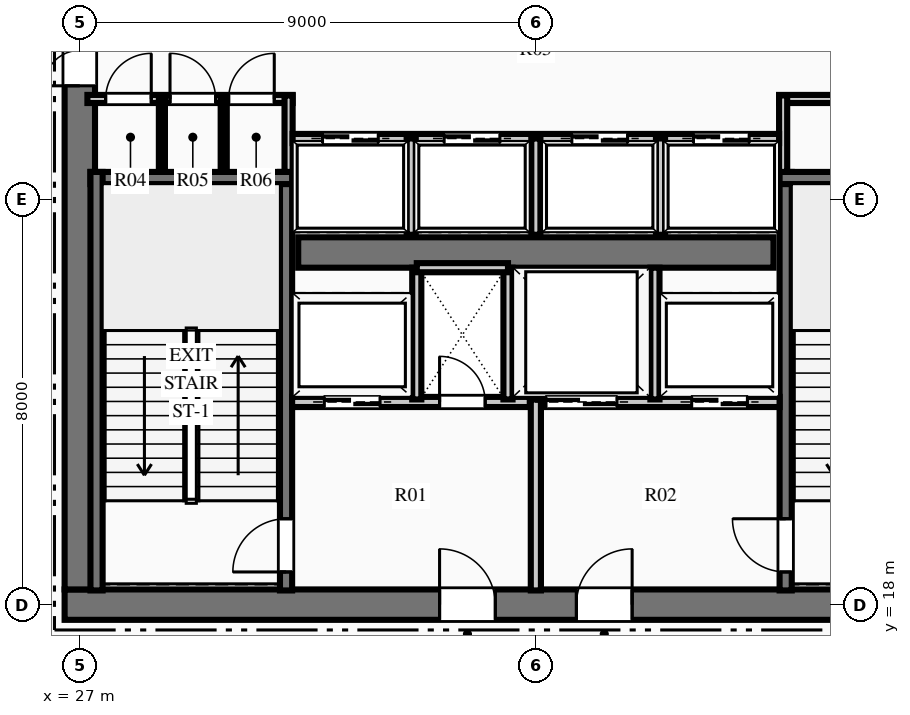
"""IFC4 building model, lengths in metres.
Left out: names, types, materials, properties, quantities, classifications, styles, units other than length and angle.
Written with IfcOpenShell. Run it as: python <this file> out.ifc"""

import sys

from ifc_helpers import new_model, si_unit, direction, frame, frame_2d, origin, place, context, subcontext, project, spatial, rectangle, extrude, element, fill, save


model = new_model("IFC4")
c1 = context("Model", 3, precision=1e-05, world=origin(), true_north=direction((0.0, 1.0)))
c2 = subcontext(c1, "Body", "Model", "MODEL_VIEW")
j1 = project(units=[si_unit("LENGTHUNIT", "METRE"), si_unit("PLANEANGLEUNIT", "RADIAN")], contexts=[c1])
p1 = place(None, origin())
s1 = spatial("IfcSite", under=j1, at=p1, CompositionType="ELEMENT")
p2 = place(p1, origin())
s2 = spatial("IfcBuilding", under=s1, at=p2, CompositionType="ELEMENT")
p3 = place(p2, frame((0.0, 0.0, 28.2)))
s3 = spatial("IfcBuildingStorey", under=s2, at=p3, CompositionType="ELEMENT", Elevation=28.2)
p4 = place(p3, frame((26.7, 18.0, 0.0), z_axis=(0.0, 0.0, 1.0), x_axis=(1.0, 0.0, 0.0)))
e1 = element("IfcWall", 1, at=p4, inside=s3, PredefinedType="SHEAR", context=c2, shape_type="SweptSolid", body=[
    extrude(rectangle(XDim=18.6, YDim=0.6, at=frame_2d((9.3, 0.0))), origin(), (0.0, 0.0, 1.0), 4.5),
])
p5 = place(p4, frame((7.4, 0.0, 0.0)))
e2 = element("IfcOpeningElement", 2, at=p5, cuts=e1, PredefinedType="OPENING", context=c2, shape_type="SweptSolid", body=[
    extrude(rectangle(XDim=1.1, YDim=2.15, at=frame_2d((0.55, 1.075))), frame((0.0, 0.31, 0.0), z_axis=(0.0, -1.0, 0.0), x_axis=(1.0, 0.0, 0.0)), (0.0, 0.0, 1.0), 0.62),
])
p6 = place(p4, frame((10.1, 0.0, 0.0)))
e3 = element("IfcOpeningElement", 3, at=p6, cuts=e1, PredefinedType="OPENING", context=c2, shape_type="SweptSolid", body=[
    extrude(rectangle(XDim=1.1, YDim=2.15, at=frame_2d((0.55, 1.075))), frame((0.0, 0.31, 0.0), z_axis=(0.0, -1.0, 0.0), x_axis=(1.0, 0.0, 0.0)), (0.0, 0.0, 1.0), 0.62),
])
p7 = place(p3, frame((27.0, 18.3, 0.0), z_axis=(0.0, 0.0, 1.0), x_axis=(0.0, 1.0, 0.0)))
e4 = element("IfcWall", 4, at=p7, inside=s3, PredefinedType="SHEAR", context=c2, shape_type="SweptSolid", body=[
    extrude(rectangle(XDim=15.4, YDim=0.6, at=frame_2d((7.7, 0.0))), origin(), (0.0, 0.0, 1.0), 4.5),
])
p8 = place(p7, frame((9.94, 0.0, 0.0)))
e5 = element("IfcOpeningElement", 5, at=p8, cuts=e4, PredefinedType="OPENING", context=c2, shape_type="SweptSolid", body=[
    extrude(rectangle(XDim=1.4, YDim=2.2, at=frame_2d((0.7, 1.1))), frame((0.0, 0.31, 0.0), z_axis=(0.0, -1.0, 0.0), x_axis=(1.0, 0.0, 0.0)), (0.0, 0.0, 1.0), 0.62),
])
p9 = place(p3, frame((31.31, 24.95, 0.0), z_axis=(0.0, 0.0, 1.0), x_axis=(1.0, 0.0, 0.0)))
e6 = element("IfcWall", 6, at=p9, inside=s3, PredefinedType="SHEAR", context=c2, shape_type="SweptSolid", body=[
    extrude(rectangle(XDim=9.38, YDim=0.6, at=frame_2d((4.69, 0.0))), origin(), (0.0, 0.0, 1.0), 4.5),
])
p10 = place(p3, frame((31.07, 18.28, 0.0), z_axis=(0.0, 0.0, 1.0), x_axis=(0.0, 1.0, 0.0)))
e7 = element("IfcWall", 7, at=p10, inside=s3, PredefinedType="SHEAR", context=c2, shape_type="SweptSolid", body=[
    extrude(rectangle(XDim=8.26, YDim=0.24, at=frame_2d((4.13, 0.0))), origin(), (0.0, 0.0, 1.0), 4.5),
])
p11 = place(p10, frame((0.365, 0.0, 0.0)))
e8 = element("IfcOpeningElement", 8, at=p11, cuts=e7, PredefinedType="OPENING", context=c2, shape_type="SweptSolid", body=[
    extrude(rectangle(XDim=1.05, YDim=2.15, at=frame_2d((0.525, 1.075))), frame((0.0, 0.13, 0.0), z_axis=(0.0, -1.0, 0.0), x_axis=(1.0, 0.0, 0.0)), (0.0, 0.0, 1.0), 0.26),
])
p12 = place(p3, frame((27.21, 26.42, 0.0), z_axis=(0.0, 0.0, 1.0), x_axis=(1.0, 0.0, 0.0)))
e9 = element("IfcWall", 9, at=p12, inside=s3, PredefinedType="SHEAR", context=c2, shape_type="SweptSolid", body=[
    extrude(rectangle(XDim=3.98, YDim=0.24, at=frame_2d((1.99, 0.0))), origin(), (0.0, 0.0, 1.0), 4.5),
])
p13 = place(p3, frame((27.33, 18.28, 0.0), z_axis=(0.0, 0.0, 1.0), x_axis=(0.0, 1.0, 0.0)))
e10 = element("IfcWall", 10, at=p13, inside=s3, PredefinedType="SHEAR", context=c2, shape_type="SweptSolid", body=[
    extrude(rectangle(XDim=8.26, YDim=0.24, at=frame_2d((4.13, 0.0))), origin(), (0.0, 0.0, 1.0), 4.5),
])
p14 = place(p3, frame((40.93, 18.28, 0.0), z_axis=(0.0, 0.0, 1.0), x_axis=(0.0, 1.0, 0.0)))
e11 = element("IfcWall", 11, at=p14, inside=s3, PredefinedType="SHEAR", context=c2, shape_type="SweptSolid", body=[
    extrude(rectangle(XDim=8.26, YDim=0.24, at=frame_2d((4.13, 0.0))), origin(), (0.0, 0.0, 1.0), 4.5),
])
p15 = place(p14, frame((0.365, 0.0, 0.0)))
e12 = element("IfcOpeningElement", 12, at=p15, cuts=e11, PredefinedType="OPENING", context=c2, shape_type="SweptSolid", body=[
    extrude(rectangle(XDim=1.05, YDim=2.15, at=frame_2d((0.525, 1.075))), frame((0.0, 0.13, 0.0), z_axis=(0.0, -1.0, 0.0), x_axis=(1.0, 0.0, 0.0)), (0.0, 0.0, 1.0), 0.26),
])
p16 = place(p3, frame((40.81, 26.42, 0.0), z_axis=(0.0, 0.0, 1.0), x_axis=(1.0, 0.0, 0.0)))
e13 = element("IfcWall", 13, at=p16, inside=s3, PredefinedType="SHEAR", context=c2, shape_type="SweptSolid", body=[
    extrude(rectangle(XDim=3.98, YDim=0.24, at=frame_2d((1.99, 0.0))), origin(), (0.0, 0.0, 1.0), 4.5),
])
p17 = place(p3, frame((36.0, 18.28, 0.0), z_axis=(0.0, 0.0, 1.0), x_axis=(0.0, 1.0, 0.0)))
e14 = element("IfcWall", 14, at=p17, inside=s3, PredefinedType="PARTITIONING", context=c2, shape_type="SweptSolid", body=[
    extrude(rectangle(XDim=3.77, YDim=0.2, at=frame_2d((1.885, 0.0))), origin(), (0.0, 0.0, 1.0), 4.19),
])
p18 = place(p3, frame((31.19, 22.0, 0.0), z_axis=(0.0, 0.0, 1.0), x_axis=(1.0, 0.0, 0.0)))
e15 = element("IfcWall", 15, at=p18, inside=s3, PredefinedType="PARTITIONING", context=c2, shape_type="SweptSolid", body=[
    extrude(rectangle(XDim=4.69, YDim=0.2, at=frame_2d((2.345, 0.0))), origin(), (0.0, 0.0, 1.0), 4.19),
])
p19 = place(p18, frame((2.91, 0.0, 0.0)))
e16 = element("IfcOpeningElement", 16, at=p19, cuts=e15, PredefinedType="OPENING", context=c2, shape_type="SweptSolid", body=[
    extrude(rectangle(XDim=0.9, YDim=2.15, at=frame_2d((0.45, 1.075))), frame((0.0, 0.11, 0.0), z_axis=(0.0, -1.0, 0.0), x_axis=(1.0, 0.0, 0.0)), (0.0, 0.0, 1.0), 0.22),
])
p20 = place(p18, frame((0.635, 0.0, 0.0)))
e17 = element("IfcOpeningElement", 17, at=p20, cuts=e15, PredefinedType="OPENING", context=c2, shape_type="SweptSolid", body=[
    extrude(rectangle(XDim=1.1, YDim=2.15, at=frame_2d((0.55, 1.075))), frame((0.0, 0.11, 0.0), z_axis=(0.0, -1.0, 0.0), x_axis=(1.0, 0.0, 0.0)), (0.0, 0.0, 1.0), 0.22),
])
p21 = place(p3, frame((36.12, 22.0, 0.0), z_axis=(0.0, 0.0, 1.0), x_axis=(1.0, 0.0, 0.0)))
e18 = element("IfcWall", 18, at=p21, inside=s3, PredefinedType="PARTITIONING", context=c2, shape_type="SweptSolid", body=[
    extrude(rectangle(XDim=4.69, YDim=0.2, at=frame_2d((2.345, 0.0))), origin(), (0.0, 0.0, 1.0), 4.19),
])
p22 = place(p21, frame((2.955, 0.0, 0.0)))
e19 = element("IfcOpeningElement", 19, at=p22, cuts=e18, PredefinedType="OPENING", context=c2, shape_type="SweptSolid", body=[
    extrude(rectangle(XDim=1.1, YDim=2.15, at=frame_2d((0.55, 1.075))), frame((0.0, 0.11, 0.0), z_axis=(0.0, -1.0, 0.0), x_axis=(1.0, 0.0, 0.0)), (0.0, 0.0, 1.0), 0.22),
])
p23 = place(p21, frame((0.08, 0.0, 0.0)))
e20 = element("IfcOpeningElement", 20, at=p23, cuts=e18, PredefinedType="OPENING", context=c2, shape_type="SweptSolid", body=[
    extrude(rectangle(XDim=1.4, YDim=2.2, at=frame_2d((0.7, 1.1))), frame((0.0, 0.11, 0.0), z_axis=(0.0, -1.0, 0.0), x_axis=(1.0, 0.0, 0.0)), (0.0, 0.0, 1.0), 0.22),
])
for number, where, z_axis, x_axis in (
    (21, (33.65, 22.05, 0.0), (0.0, 0.0, 1.0), (0.0, 1.0, 0.0)),
    (22, (35.45, 22.05, 0.0), (0.0, 0.0, 1.0), (0.0, 1.0, 0.0)),
):
    element("IfcWall", number, at=place(p3, frame(where, z_axis=z_axis, x_axis=x_axis)), inside=s3, PredefinedType="PARTITIONING", context=c2, shape_type="SweptSolid", body=[
        extrude(rectangle(XDim=2.6, YDim=0.18, at=frame_2d((1.3, 0.0))), origin(), (0.0, 0.0, 1.0), 4.19),
    ])
p24 = place(p3, frame((33.65, 24.65, 0.0), z_axis=(0.0, 0.0, 1.0), x_axis=(1.0, 0.0, 0.0)))
e23 = element("IfcWall", 23, at=p24, inside=s3, PredefinedType="PARTITIONING", context=c2, shape_type="SweptSolid", body=[
    extrude(rectangle(XDim=1.8, YDim=0.18, at=frame_2d((0.9, 0.0))), origin(), (0.0, 0.0, 1.0), 4.19),
])
p25 = place(p3, frame((38.35, 22.05, 0.0), z_axis=(0.0, 0.0, 1.0), x_axis=(0.0, 1.0, 0.0)))
e24 = element("IfcWall", 24, at=p25, inside=s3, PredefinedType="PARTITIONING", context=c2, shape_type="SweptSolid", body=[
    extrude(rectangle(XDim=2.6, YDim=0.18, at=frame_2d((1.3, 0.0))), origin(), (0.0, 0.0, 1.0), 4.19),
])
p26 = place(p3, frame((27.15, 27.98, 0.0), z_axis=(0.0, 0.0, 1.0), x_axis=(1.0, 0.0, 0.0)))
e25 = element("IfcWall", 25, at=p26, inside=s3, PredefinedType="PARTITIONING", context=c2, shape_type="SweptSolid", body=[
    extrude(rectangle(XDim=4.05, YDim=0.16, at=frame_2d((2.025, 0.0))), origin(), (0.0, 0.0, 1.0), 4.19),
])
p27 = place(p26, frame((0.36, 0.0, 0.0)))
e26 = element("IfcOpeningElement", 26, at=p27, cuts=e25, PredefinedType="OPENING", context=c2, shape_type="SweptSolid", body=[
    extrude(rectangle(XDim=0.9, YDim=2.15, at=frame_2d((0.45, 1.075))), frame((0.0, 0.09, 0.0), z_axis=(0.0, -1.0, 0.0), x_axis=(1.0, 0.0, 0.0)), (0.0, 0.0, 1.0), 0.18),
])
p28 = place(p26, frame((1.63, 0.0, 0.0)))
e27 = element("IfcOpeningElement", 27, at=p28, cuts=e25, PredefinedType="OPENING", context=c2, shape_type="SweptSolid", body=[
    extrude(rectangle(XDim=0.9, YDim=2.15, at=frame_2d((0.45, 1.075))), frame((0.0, 0.09, 0.0), z_axis=(0.0, -1.0, 0.0), x_axis=(1.0, 0.0, 0.0)), (0.0, 0.0, 1.0), 0.18),
])
p29 = place(p26, frame((2.788, 0.0, 0.0)))
e28 = element("IfcOpeningElement", 28, at=p29, cuts=e25, PredefinedType="OPENING", context=c2, shape_type="SweptSolid", body=[
    extrude(rectangle(XDim=0.9, YDim=2.15, at=frame_2d((0.45, 1.075))), frame((0.0, 0.09, 0.0), z_axis=(0.0, -1.0, 0.0), x_axis=(1.0, 0.0, 0.0)), (0.0, 0.0, 1.0), 0.18),
])
p30 = place(p3, frame((31.12, 26.54, 0.0), z_axis=(0.0, 0.0, 1.0), x_axis=(0.0, 1.0, 0.0)))
e29 = element("IfcWall", 29, at=p30, inside=s3, PredefinedType="PARTITIONING", context=c2, shape_type="SweptSolid", body=[
    extrude(rectangle(XDim=1.51, YDim=0.16, at=frame_2d((0.755, 0.0))), origin(), (0.0, 0.0, 1.0), 4.19),
])
p31 = place(p3, frame((40.8, 27.98, 0.0), z_axis=(0.0, 0.0, 1.0), x_axis=(1.0, 0.0, 0.0)))
e30 = element("IfcWall", 30, at=p31, inside=s3, PredefinedType="PARTITIONING", context=c2, shape_type="SweptSolid", body=[
    extrude(rectangle(XDim=4.05, YDim=0.16, at=frame_2d((2.025, 0.0))), origin(), (0.0, 0.0, 1.0), 4.19),
])
p32 = place(p31, frame((1.475, 0.0, 0.0)))
e31 = element("IfcOpeningElement", 31, at=p32, cuts=e30, PredefinedType="OPENING", context=c2, shape_type="SweptSolid", body=[
    extrude(rectangle(XDim=0.95, YDim=2.15, at=frame_2d((0.475, 1.075))), frame((0.0, 0.09, 0.0), z_axis=(0.0, -1.0, 0.0), x_axis=(1.0, 0.0, 0.0)), (0.0, 0.0, 1.0), 0.18),
])
p33 = place(p3, frame((40.88, 26.54, 0.0), z_axis=(0.0, 0.0, 1.0), x_axis=(0.0, 1.0, 0.0)))
e32 = element("IfcWall", 32, at=p33, inside=s3, PredefinedType="PARTITIONING", context=c2, shape_type="SweptSolid", body=[
    extrude(rectangle(XDim=1.51, YDim=0.16, at=frame_2d((0.755, 0.0))), origin(), (0.0, 0.0, 1.0), 4.19),
])
for number, where, z_axis, x_axis in (
    (33, (28.62, 26.54, 0.0), (0.0, 0.0, 1.0), (0.0, 1.0, 0.0)),
    (34, (29.84, 26.54, 0.0), (0.0, 0.0, 1.0), (0.0, 1.0, 0.0)),
):
    element("IfcWall", number, at=place(p3, frame(where, z_axis=z_axis, x_axis=x_axis)), inside=s3, PredefinedType="PARTITIONING", context=c2, shape_type="SweptSolid", body=[
        extrude(rectangle(XDim=1.44, YDim=0.12, at=frame_2d((0.72, 0.0))), origin(), (0.0, 0.0, 1.0), 4.19),
    ])
p34 = place(p3, frame((31.2, 27.2, 0.0), z_axis=(0.0, 0.0, 1.0), x_axis=(1.0, 0.0, 0.0)))
e35 = element("IfcWall", 35, at=p34, inside=s3, PredefinedType="PARTITIONING", context=c2, shape_type="SweptSolid", body=[
    extrude(rectangle(XDim=9.6, YDim=0.18, at=frame_2d((4.8, 0.0))), origin(), (0.0, 0.0, 1.0), 4.19),
])
p35 = place(p34, frame((0.59, 0.0, 0.0)))
e36 = element("IfcOpeningElement", 36, at=p35, cuts=e35, PredefinedType="OPENING", context=c2, shape_type="SweptSolid", body=[
    extrude(rectangle(XDim=1.1, YDim=2.15, at=frame_2d((0.55, 1.075))), frame((0.0, 0.1, 0.0), z_axis=(0.0, -1.0, 0.0), x_axis=(1.0, 0.0, 0.0)), (0.0, 0.0, 1.0), 0.2),
])
p36 = place(p34, frame((2.99, 0.0, 0.0)))
e37 = element("IfcOpeningElement", 37, at=p36, cuts=e35, PredefinedType="OPENING", context=c2, shape_type="SweptSolid", body=[
    extrude(rectangle(XDim=1.1, YDim=2.15, at=frame_2d((0.55, 1.075))), frame((0.0, 0.1, 0.0), z_axis=(0.0, -1.0, 0.0), x_axis=(1.0, 0.0, 0.0)), (0.0, 0.0, 1.0), 0.2),
])
p37 = place(p34, frame((5.51, 0.0, 0.0)))
e38 = element("IfcOpeningElement", 38, at=p37, cuts=e35, PredefinedType="OPENING", context=c2, shape_type="SweptSolid", body=[
    extrude(rectangle(XDim=1.1, YDim=2.15, at=frame_2d((0.55, 1.075))), frame((0.0, 0.1, 0.0), z_axis=(0.0, -1.0, 0.0), x_axis=(1.0, 0.0, 0.0)), (0.0, 0.0, 1.0), 0.2),
])
p38 = place(p34, frame((7.91, 0.0, 0.0)))
e39 = element("IfcOpeningElement", 39, at=p38, cuts=e35, PredefinedType="OPENING", context=c2, shape_type="SweptSolid", body=[
    extrude(rectangle(XDim=1.1, YDim=2.15, at=frame_2d((0.55, 1.075))), frame((0.0, 0.1, 0.0), z_axis=(0.0, -1.0, 0.0), x_axis=(1.0, 0.0, 0.0)), (0.0, 0.0, 1.0), 0.2),
])
for number, where, z_axis, x_axis in (
    (40, (33.54, 25.3, 0.0), (0.0, 0.0, 1.0), (0.0, 1.0, 0.0)),
    (41, (36.0, 25.3, 0.0), (0.0, 0.0, 1.0), (0.0, 1.0, 0.0)),
    (42, (38.46, 25.3, 0.0), (0.0, 0.0, 1.0), (0.0, 1.0, 0.0)),
):
    element("IfcWall", number, at=place(p3, frame(where, z_axis=z_axis, x_axis=x_axis)), inside=s3, PredefinedType="PARTITIONING", context=c2, shape_type="SweptSolid", body=[
        extrude(rectangle(XDim=1.9, YDim=0.18, at=frame_2d((0.95, 0.0))), origin(), (0.0, 0.0, 1.0), 4.19),
    ])
p39 = place(p27, origin())
e43 = element("IfcDoor", 43, at=p39, inside=s3, OperationType="SINGLE_SWING_RIGHT", PredefinedType="DOOR", context=c2, shape_type="SweptSolid", body=[
    extrude(rectangle(XDim=0.9, YDim=2.15, at=frame_2d((0.45, 1.075))), frame((0.0, 0.025, 0.0), z_axis=(0.0, -1.0, 0.0), x_axis=(1.0, 0.0, 0.0)), (0.0, 0.0, 1.0), 0.05),
])
fill(e26, e43)
p40 = place(p28, origin())
e44 = element("IfcDoor", 44, at=p40, inside=s3, OperationType="SINGLE_SWING_LEFT", PredefinedType="DOOR", context=c2, shape_type="SweptSolid", body=[
    extrude(rectangle(XDim=0.9, YDim=2.15, at=frame_2d((0.45, 1.075))), frame((0.0, 0.025, 0.0), z_axis=(0.0, -1.0, 0.0), x_axis=(1.0, 0.0, 0.0)), (0.0, 0.0, 1.0), 0.05),
])
fill(e27, e44)
p41 = place(p29, origin())
e45 = element("IfcDoor", 45, at=p41, inside=s3, OperationType="SINGLE_SWING_RIGHT", PredefinedType="DOOR", context=c2, shape_type="SweptSolid", body=[
    extrude(rectangle(XDim=0.9, YDim=2.15, at=frame_2d((0.45, 1.075))), frame((0.0, 0.025, 0.0), z_axis=(0.0, -1.0, 0.0), x_axis=(1.0, 0.0, 0.0)), (0.0, 0.0, 1.0), 0.05),
])
fill(e28, e45)
p42 = place(p11, origin())
e46 = element("IfcDoor", 46, at=p42, inside=s3, OperationType="SINGLE_SWING_LEFT", PredefinedType="DOOR", context=c2, shape_type="SweptSolid", body=[
    extrude(rectangle(XDim=1.05, YDim=2.15, at=frame_2d((0.525, 1.075))), frame((0.0, 0.025, 0.0), z_axis=(0.0, -1.0, 0.0), x_axis=(1.0, 0.0, 0.0)), (0.0, 0.0, 1.0), 0.05),
])
fill(e8, e46)
p43 = place(p15, origin())
e47 = element("IfcDoor", 47, at=p43, inside=s3, OperationType="SINGLE_SWING_RIGHT", PredefinedType="DOOR", context=c2, shape_type="SweptSolid", body=[
    extrude(rectangle(XDim=1.05, YDim=2.15, at=frame_2d((0.525, 1.075))), frame((0.0, 0.025, 0.0), z_axis=(0.0, -1.0, 0.0), x_axis=(1.0, 0.0, 0.0)), (0.0, 0.0, 1.0), 0.05),
])
fill(e12, e47)
p44 = place(p5, origin())
e48 = element("IfcDoor", 48, at=p44, inside=s3, OperationType="SINGLE_SWING_LEFT", PredefinedType="DOOR", context=c2, shape_type="SweptSolid", body=[
    extrude(rectangle(XDim=1.1, YDim=2.15, at=frame_2d((0.55, 1.075))), frame((0.0, 0.025, 0.0), z_axis=(0.0, -1.0, 0.0), x_axis=(1.0, 0.0, 0.0)), (0.0, 0.0, 1.0), 0.05),
])
fill(e2, e48)
p45 = place(p6, origin())
e49 = element("IfcDoor", 49, at=p45, inside=s3, OperationType="SINGLE_SWING_RIGHT", PredefinedType="DOOR", context=c2, shape_type="SweptSolid", body=[
    extrude(rectangle(XDim=1.1, YDim=2.15, at=frame_2d((0.55, 1.075))), frame((0.0, 0.025, 0.0), z_axis=(0.0, -1.0, 0.0), x_axis=(1.0, 0.0, 0.0)), (0.0, 0.0, 1.0), 0.05),
])
fill(e3, e49)
p46 = place(p19, origin())
e50 = element("IfcDoor", 50, at=p46, inside=s3, OperationType="SINGLE_SWING_LEFT", PredefinedType="DOOR", context=c2, shape_type="SweptSolid", body=[
    extrude(rectangle(XDim=0.9, YDim=2.15, at=frame_2d((0.45, 1.075))), frame((0.0, 0.025, 0.0), z_axis=(0.0, -1.0, 0.0), x_axis=(1.0, 0.0, 0.0)), (0.0, 0.0, 1.0), 0.05),
])
fill(e16, e50)
p47 = place(p8, origin())
e51 = element("IfcDoor", 51, at=p47, inside=s3, OperationType="DOUBLE_DOOR_SINGLE_SWING", PredefinedType="DOOR", context=c2, shape_type="SweptSolid", body=[
    extrude(rectangle(XDim=1.4, YDim=2.2, at=frame_2d((0.7, 1.1))), frame((0.0, 0.025, 0.0), z_axis=(0.0, -1.0, 0.0), x_axis=(1.0, 0.0, 0.0)), (0.0, 0.0, 1.0), 0.05),
])
fill(e5, e51)
p48 = place(p35, origin())
e52 = element("IfcDoor", 52, at=p48, inside=s3, OperationType="SLIDING_TO_LEFT", PredefinedType="DOOR", context=c2, shape_type="SweptSolid", body=[
    extrude(rectangle(XDim=1.1, YDim=2.15, at=frame_2d((0.55, 1.075))), frame((0.0, 0.025, 0.0), z_axis=(0.0, -1.0, 0.0), x_axis=(1.0, 0.0, 0.0)), (0.0, 0.0, 1.0), 0.05),
])
fill(e36, e52)
p49 = place(p36, origin())
e53 = element("IfcDoor", 53, at=p49, inside=s3, OperationType="SLIDING_TO_LEFT", PredefinedType="DOOR", context=c2, shape_type="SweptSolid", body=[
    extrude(rectangle(XDim=1.1, YDim=2.15, at=frame_2d((0.55, 1.075))), frame((0.0, 0.025, 0.0), z_axis=(0.0, -1.0, 0.0), x_axis=(1.0, 0.0, 0.0)), (0.0, 0.0, 1.0), 0.05),
])
fill(e37, e53)
p50 = place(p37, origin())
e54 = element("IfcDoor", 54, at=p50, inside=s3, OperationType="SLIDING_TO_LEFT", PredefinedType="DOOR", context=c2, shape_type="SweptSolid", body=[
    extrude(rectangle(XDim=1.1, YDim=2.15, at=frame_2d((0.55, 1.075))), frame((0.0, 0.025, 0.0), z_axis=(0.0, -1.0, 0.0), x_axis=(1.0, 0.0, 0.0)), (0.0, 0.0, 1.0), 0.05),
])
fill(e38, e54)
p51 = place(p38, origin())
e55 = element("IfcDoor", 55, at=p51, inside=s3, OperationType="SLIDING_TO_LEFT", PredefinedType="DOOR", context=c2, shape_type="SweptSolid", body=[
    extrude(rectangle(XDim=1.1, YDim=2.15, at=frame_2d((0.55, 1.075))), frame((0.0, 0.025, 0.0), z_axis=(0.0, -1.0, 0.0), x_axis=(1.0, 0.0, 0.0)), (0.0, 0.0, 1.0), 0.05),
])
fill(e39, e55)
p52 = place(p20, origin())
e56 = element("IfcDoor", 56, at=p52, inside=s3, OperationType="SLIDING_TO_LEFT", PredefinedType="DOOR", context=c2, shape_type="SweptSolid", body=[
    extrude(rectangle(XDim=1.1, YDim=2.15, at=frame_2d((0.55, 1.075))), frame((0.0, 0.025, 0.0), z_axis=(0.0, -1.0, 0.0), x_axis=(1.0, 0.0, 0.0)), (0.0, 0.0, 1.0), 0.05),
])
fill(e17, e56)
p53 = place(p22, origin())
e57 = element("IfcDoor", 57, at=p53, inside=s3, OperationType="SLIDING_TO_LEFT", PredefinedType="DOOR", context=c2, shape_type="SweptSolid", body=[
    extrude(rectangle(XDim=1.1, YDim=2.15, at=frame_2d((0.55, 1.075))), frame((0.0, 0.025, 0.0), z_axis=(0.0, -1.0, 0.0), x_axis=(1.0, 0.0, 0.0)), (0.0, 0.0, 1.0), 0.05),
])
fill(e19, e57)
p54 = place(p23, origin())
e58 = element("IfcDoor", 58, at=p54, inside=s3, OperationType="SLIDING_TO_LEFT", PredefinedType="DOOR", context=c2, shape_type="SweptSolid", body=[
    extrude(rectangle(XDim=1.4, YDim=2.2, at=frame_2d((0.7, 1.1))), frame((0.0, 0.025, 0.0), z_axis=(0.0, -1.0, 0.0), x_axis=(1.0, 0.0, 0.0)), (0.0, 0.0, 1.0), 0.05),
])
fill(e20, e58)
save(model, sys.argv[1])
